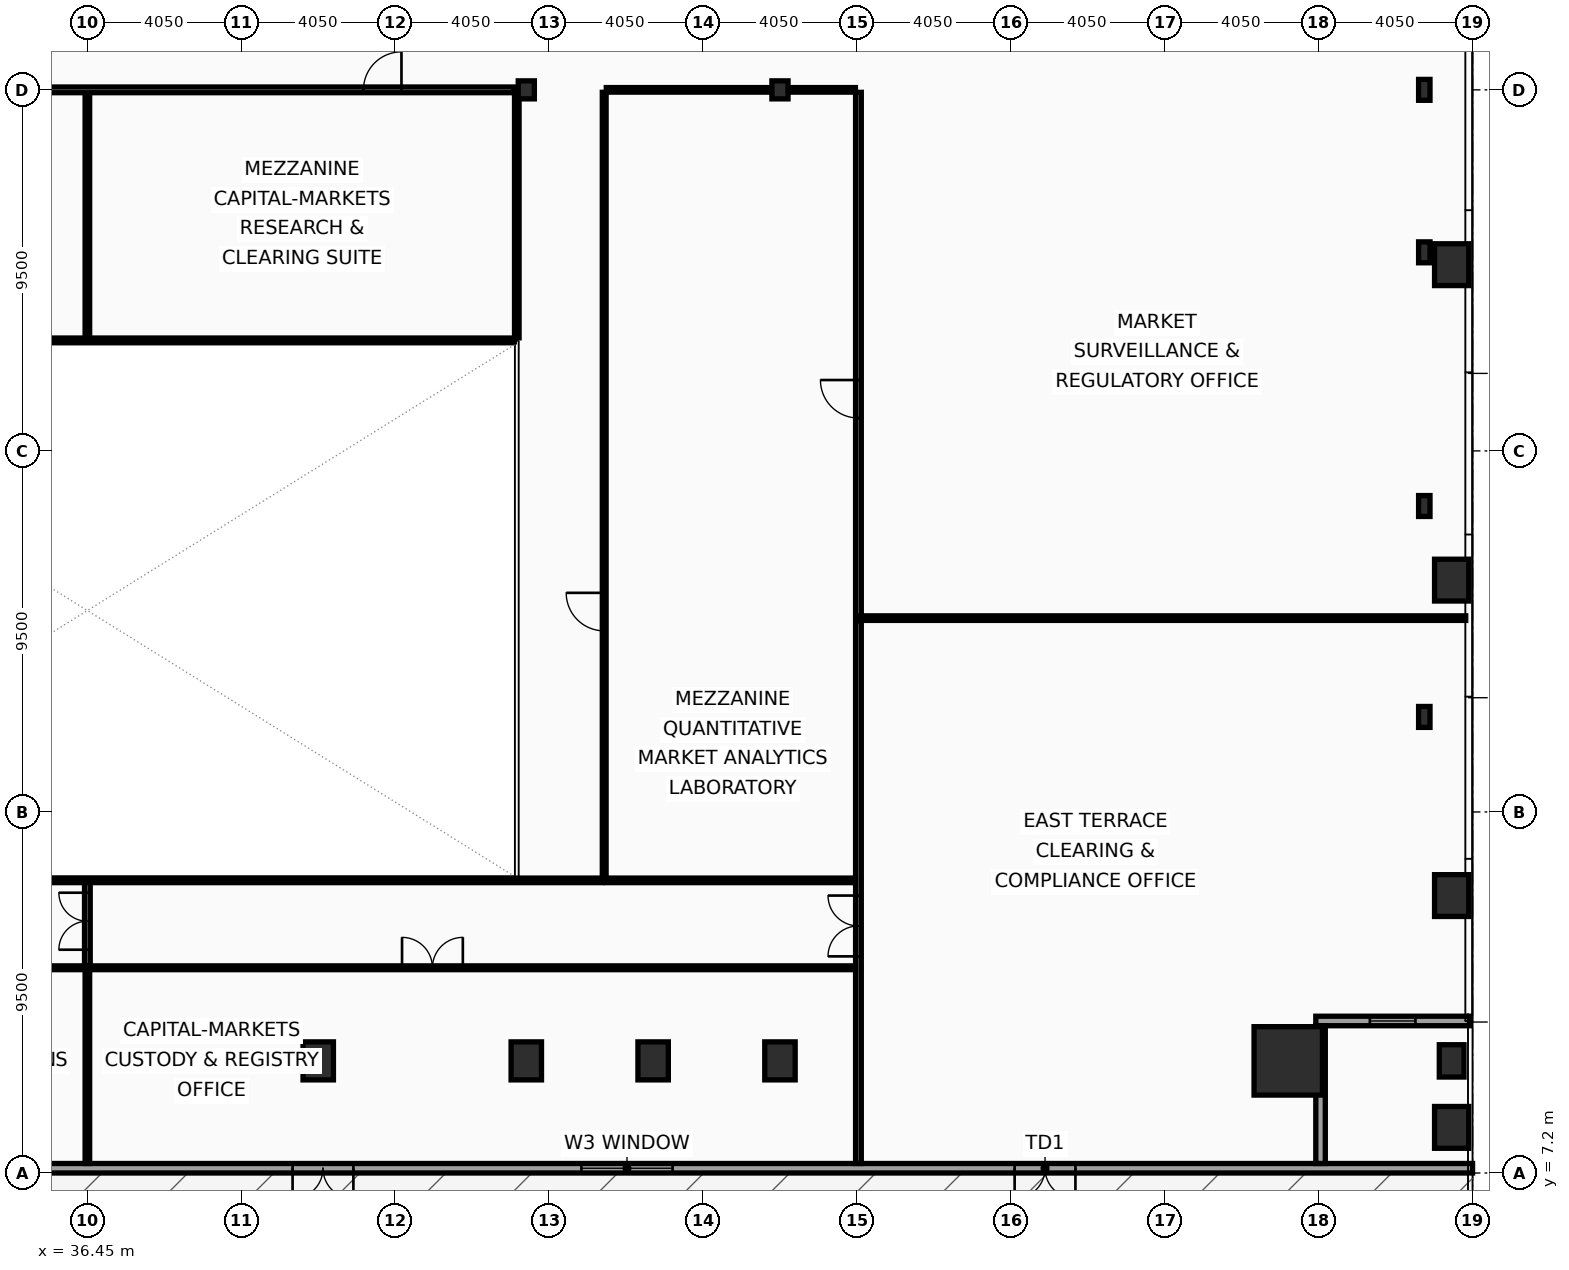
"""IFC4 building model, lengths in metres.
Left out: names, types, materials, properties, quantities, classifications, styles, units other than length and angle.
Written with IfcOpenShell. Run it as: python <this file> out.ifc"""

import sys

from ifc_helpers import new_model, si_unit, direction, frame, frame_2d, origin, origin_2d, place, context, subcontext, project, spatial, rectangle, hollow_rectangle, i_section, extrude, element, fill, save


model = new_model("IFC4")
c1 = context("Model", 3, precision=1e-05, world=origin(), true_north=direction((0.0, 1.0)))
c2 = subcontext(c1, "Body", "Model", "MODEL_VIEW")
j1 = project(units=[si_unit("LENGTHUNIT", "METRE"), si_unit("PLANEANGLEUNIT", "RADIAN")], contexts=[c1])
p1 = place(None, origin())
s1 = spatial("IfcSite", under=j1, at=p1, CompositionType="ELEMENT")
p2 = place(p1, origin())
s2 = spatial("IfcBuilding", under=s1, at=p2, CompositionType="ELEMENT")
p3 = place(p2, frame((0.0, 0.0, 5.4)))
s3 = spatial("IfcBuildingStorey", under=s2, at=p3, CompositionType="ELEMENT", Elevation=5.4)
p4 = place(p3, frame((68.05, 10.15, 0.0), z_axis=(0.0, 0.0, 1.0), x_axis=(1.0, 0.0, 0.0)))
e1 = element("IfcColumn", 1, at=p4, inside=s3, PredefinedType="COLUMN", context=c2, shape_type="SweptSolid", body=[
    extrude(hollow_rectangle(XDim=1.8, YDim=1.8, WallThickness=0.08, at=origin_2d()), origin(), (0.0, 0.0, 1.0), 5.0),
])
for number, where, z_axis, x_axis in (
    (2, (42.525, 10.15, 0.0), (0.0, 0.0, 1.0), (1.0, 0.0, 0.0)),
    (3, (48.0, 10.15, 0.0), (0.0, 0.0, 1.0), (1.0, 0.0, 0.0)),
    (4, (51.337, 10.15, 0.0), (0.0, 0.0, 1.0), (1.0, 0.0, 0.0)),
    (5, (54.675, 10.15, 0.0), (0.0, 0.0, 1.0), (1.0, 0.0, 0.0)),
):
    element("IfcColumn", number, at=place(p3, frame(where, z_axis=z_axis, x_axis=x_axis)), inside=s3, PredefinedType="COLUMN", context=c2, shape_type="SweptSolid", body=[
        extrude(hollow_rectangle(XDim=0.8, YDim=1.0, WallThickness=0.055, at=origin_2d()), origin(), (0.0, 0.0, 1.0), 5.0),
    ])
for number, where, z_axis, x_axis in (
    (6, (71.63, 19.2, 0.0), (0.0, 0.0, 1.0), (1.0, 0.0, 0.0)),
    (7, (71.63, 24.75, 0.0), (0.0, 0.0, 1.0), (1.0, 0.0, 0.0)),
    (8, (71.63, 31.425, 0.0), (0.0, 0.0, 1.0), (1.0, 0.0, 0.0)),
    (9, (71.63, 35.7, 0.0), (0.0, 0.0, 1.0), (1.0, 0.0, 0.0)),
):
    element("IfcColumn", number, at=place(p3, frame(where, z_axis=z_axis, x_axis=x_axis)), inside=s3, PredefinedType="COLUMN", context=c2, shape_type="SweptSolid", body=[
        extrude(i_section(OverallWidth=0.3, OverallDepth=0.55, WebThickness=0.015, FlangeThickness=0.029, at=origin_2d()), origin(), (0.0, 0.0, 1.0), 5.0),
    ])
for number, where, z_axis, x_axis in (
    (10, (48.0, 35.7, 0.0), (0.0, 0.0, 1.0), (1.0, 0.0, 0.0)),
    (11, (54.675, 35.7, 0.0), (0.0, 0.0, 1.0), (1.0, 0.0, 0.0)),
):
    element("IfcColumn", number, at=place(p3, frame(where, z_axis=z_axis, x_axis=x_axis)), inside=s3, PredefinedType="COLUMN", context=c2, shape_type="SweptSolid", body=[
        extrude(i_section(OverallWidth=0.424, OverallDepth=0.474, WebThickness=0.048, FlangeThickness=0.077, at=origin_2d()), origin(), (0.0, 0.0, 1.0), 5.0),
    ])
p5 = place(p3, frame((72.35, 8.4, 0.0), z_axis=(0.0, 0.0, 1.0), x_axis=(1.0, 0.0, 0.0)))
e12 = element("IfcColumn", 12, at=p5, inside=s3, PredefinedType="PILASTER", context=c2, shape_type="SweptSolid", body=[
    extrude(rectangle(XDim=0.9, YDim=1.1, at=origin_2d()), origin(), (0.0, 0.0, 1.0), 5.0),
])
p6 = place(p3, frame((72.35, 10.15, 0.0), z_axis=(0.0, 0.0, 1.0), x_axis=(1.0, 0.0, 0.0)))
e13 = element("IfcColumn", 13, at=p6, inside=s3, PredefinedType="PILASTER", context=c2, shape_type="SweptSolid", body=[
    extrude(rectangle(XDim=0.65, YDim=0.85, at=origin_2d()), origin(), (0.0, 0.0, 1.0), 5.0),
])
for number, where, z_axis, x_axis in (
    (14, (72.35, 14.5, 0.0), (0.0, 0.0, 1.0), (1.0, 0.0, 0.0)),
    (15, (72.35, 22.8, 0.0), (0.0, 0.0, 1.0), (1.0, 0.0, 0.0)),
    (16, (72.35, 31.1, 0.0), (0.0, 0.0, 1.0), (1.0, 0.0, 0.0)),
):
    element("IfcColumn", number, at=place(p3, frame(where, z_axis=z_axis, x_axis=x_axis)), inside=s3, PredefinedType="PILASTER", context=c2, shape_type="SweptSolid", body=[
        extrude(rectangle(XDim=0.9, YDim=1.1, at=origin_2d()), origin(), (0.0, 0.0, 1.0), 5.0),
    ])
p7 = place(p3, frame((72.9, 7.325, 0.0), z_axis=(0.0, 0.0, 1.0), x_axis=(-1.0, 0.0, 0.0)))
e17 = element("IfcWall", 17, at=p7, inside=s3, PredefinedType="SOLIDWALL", context=c2, shape_type="SweptSolid", body=[
    extrude(rectangle(XDim=72.9, YDim=0.25, at=frame_2d((36.45, 0.0))), origin(), (0.0, 0.0, 1.0), 3.89),
])
p8 = place(p7, frame((10.45, 0.0, 0.0)))
e18 = element("IfcOpeningElement", 18, at=p8, cuts=e17, PredefinedType="OPENING", context=c2, shape_type="SweptSolid", body=[
    extrude(rectangle(XDim=1.6, YDim=2.2, at=frame_2d((0.8, 1.1))), frame((0.0, 0.135, 0.0), z_axis=(0.0, -1.0, 0.0), x_axis=(1.0, 0.0, 0.0)), (0.0, 0.0, 1.0), 0.27),
])
p9 = place(p7, frame((29.45, 0.0, 0.0)))
e19 = element("IfcOpeningElement", 19, at=p9, cuts=e17, PredefinedType="OPENING", context=c2, shape_type="SweptSolid", body=[
    extrude(rectangle(XDim=1.6, YDim=2.2, at=frame_2d((0.8, 1.1))), frame((0.0, 0.135, 0.0), z_axis=(0.0, -1.0, 0.0), x_axis=(1.0, 0.0, 0.0)), (0.0, 0.0, 1.0), 0.27),
])
p10 = place(p7, frame((60.65, 0.0, 0.0)))
e20 = element("IfcOpeningElement", 20, at=p10, cuts=e17, PredefinedType="OPENING", context=c2, shape_type="SweptSolid", body=[
    extrude(rectangle(XDim=1.05, YDim=2.15, at=frame_2d((0.525, 1.075))), frame((0.0, 0.135, 0.0), z_axis=(0.0, -1.0, 0.0), x_axis=(1.0, 0.0, 0.0)), (0.0, 0.0, 1.0), 0.27),
])
p11 = place(p7, frame((21.05, 0.0, 0.85)))
e21 = element("IfcOpeningElement", 21, at=p11, cuts=e17, PredefinedType="OPENING", context=c2, shape_type="SweptSolid", body=[
    extrude(rectangle(XDim=2.4, YDim=2.6, at=frame_2d((1.2, 1.3))), frame((0.0, 0.135, 0.0), z_axis=(0.0, -1.0, 0.0), x_axis=(1.0, 0.0, 0.0)), (0.0, 0.0, 1.0), 0.27),
])
p12 = place(p7, frame((49.65, 0.0, 0.85)))
e22 = element("IfcOpeningElement", 22, at=p12, cuts=e17, PredefinedType="OPENING", context=c2, shape_type="SweptSolid", body=[
    extrude(rectangle(XDim=2.4, YDim=2.6, at=frame_2d((1.2, 1.3))), frame((0.0, 0.135, 0.0), z_axis=(0.0, -1.0, 0.0), x_axis=(1.0, 0.0, 0.0)), (0.0, 0.0, 1.0), 0.27),
])
p13 = place(p3, frame((72.82, 11.2, 0.0), z_axis=(0.0, 0.0, 1.0), x_axis=(-1.0, 0.0, 0.0)))
e23 = element("IfcWall", 23, at=p13, inside=s3, PredefinedType="SOLIDWALL", context=c2, shape_type="SweptSolid", body=[
    extrude(rectangle(XDim=4.045, YDim=0.25, at=frame_2d((2.022, 0.0))), origin(), (0.0, 0.0, 1.0), 4.14),
])
p14 = place(p13, frame((1.423, 0.0, 0.9)))
e24 = element("IfcOpeningElement", 24, at=p14, cuts=e23, PredefinedType="OPENING", context=c2, shape_type="SweptSolid", body=[
    extrude(rectangle(XDim=1.2, YDim=2.8, at=frame_2d((0.6, 1.4))), frame((0.0, 0.135, 0.0), z_axis=(0.0, -1.0, 0.0), x_axis=(1.0, 0.0, 0.0)), (0.0, 0.0, 1.0), 0.27),
])
p15 = place(p3, frame((68.9, 11.075, 0.0), z_axis=(0.0, 0.0, 1.0), x_axis=(0.0, -1.0, 0.0)))
e25 = element("IfcWall", 25, at=p15, inside=s3, PredefinedType="SOLIDWALL", context=c2, shape_type="SweptSolid", body=[
    extrude(rectangle(XDim=3.625, YDim=0.25, at=frame_2d((1.812, 0.0))), origin(), (0.0, 0.0, 1.0), 4.14),
])
p16 = place(p3, frame((56.74, 7.45, 0.0), z_axis=(0.0, 0.0, 1.0), x_axis=(0.0, 1.0, 0.0)))
e26 = element("IfcWall", 26, at=p16, inside=s3, PredefinedType="PARTITIONING", context=c2, shape_type="SweptSolid", body=[
    extrude(rectangle(XDim=14.285, YDim=0.15, at=frame_2d((7.143, 0.0))), origin(), (0.0, 0.0, 1.0), 3.89),
])
p17 = place(p16, frame((5.45, 0.0, 0.0)))
e27 = element("IfcOpeningElement", 27, at=p17, cuts=e26, PredefinedType="OPENING", context=c2, shape_type="SweptSolid", body=[
    extrude(rectangle(XDim=1.6, YDim=2.15, at=frame_2d((0.8, 1.075))), frame((0.0, 0.085, 0.0), z_axis=(0.0, -1.0, 0.0), x_axis=(1.0, 0.0, 0.0)), (0.0, 0.0, 1.0), 0.17),
])
p18 = place(p3, frame((56.74, 21.865, 0.0), z_axis=(0.0, 0.0, 1.0), x_axis=(0.0, 1.0, 0.0)))
e28 = element("IfcWall", 28, at=p18, inside=s3, PredefinedType="PARTITIONING", context=c2, shape_type="SweptSolid", body=[
    extrude(rectangle(XDim=13.77, YDim=0.15, at=frame_2d((6.885, 0.0))), origin(), (0.0, 0.0, 1.0), 3.89),
])
p19 = place(p18, frame((5.2, 0.0, 0.0)))
e29 = element("IfcOpeningElement", 29, at=p19, cuts=e28, PredefinedType="OPENING", context=c2, shape_type="SweptSolid", body=[
    extrude(rectangle(XDim=1.0, YDim=2.05, at=frame_2d((0.5, 1.025))), frame((0.0, 0.085, 0.0), z_axis=(0.0, -1.0, 0.0), x_axis=(1.0, 0.0, 0.0)), (0.0, 0.0, 1.0), 0.17),
])
p20 = place(p3, frame((56.82, 21.8, 0.0), z_axis=(0.0, 0.0, 1.0), x_axis=(1.0, 0.0, 0.0)))
e30 = element("IfcWall", 30, at=p20, inside=s3, PredefinedType="PARTITIONING", context=c2, shape_type="SweptSolid", body=[
    extrude(rectangle(XDim=15.9, YDim=0.12, at=frame_2d((7.95, 0.0))), origin(), (0.0, 0.0, 1.0), 4.14),
])
p21 = place(p3, frame((16.24, 12.6, 0.0), z_axis=(0.0, 0.0, 1.0), x_axis=(1.0, 0.0, 0.0)))
e31 = element("IfcWall", 31, at=p21, inside=s3, PredefinedType="MOVABLE", context=c2, shape_type="SweptSolid", body=[
    extrude(rectangle(XDim=20.13, YDim=0.1, at=frame_2d((10.065, 0.0))), origin(), (0.0, 0.0, 1.0), 3.89),
])
p22 = place(p21, frame((8.2, 0.0, 0.0)))
e32 = element("IfcOpeningElement", 32, at=p22, cuts=e31, PredefinedType="OPENING", context=c2, shape_type="SweptSolid", body=[
    extrude(rectangle(XDim=1.6, YDim=2.15, at=frame_2d((0.8, 1.075))), frame((0.0, 0.06, 0.0), z_axis=(0.0, -1.0, 0.0), x_axis=(1.0, 0.0, 0.0)), (0.0, 0.0, 1.0), 0.12),
])
p23 = place(p3, frame((36.53, 12.6, 0.0), z_axis=(0.0, 0.0, 1.0), x_axis=(1.0, 0.0, 0.0)))
e33 = element("IfcWall", 33, at=p23, inside=s3, PredefinedType="MOVABLE", context=c2, shape_type="SweptSolid", body=[
    extrude(rectangle(XDim=20.13, YDim=0.1, at=frame_2d((10.065, 0.0))), origin(), (0.0, 0.0, 1.0), 3.89),
])
p24 = place(p23, frame((8.2, 0.0, 0.0)))
e34 = element("IfcOpeningElement", 34, at=p24, cuts=e33, PredefinedType="OPENING", context=c2, shape_type="SweptSolid", body=[
    extrude(rectangle(XDim=1.6, YDim=2.15, at=frame_2d((0.8, 1.075))), frame((0.0, 0.06, 0.0), z_axis=(0.0, -1.0, 0.0), x_axis=(1.0, 0.0, 0.0)), (0.0, 0.0, 1.0), 0.12),
])
p25 = place(p3, frame((36.45, 7.45, 0.0), z_axis=(0.0, 0.0, 1.0), x_axis=(0.0, 1.0, 0.0)))
e35 = element("IfcWall", 35, at=p25, inside=s3, PredefinedType="PARTITIONING", context=c2, shape_type="SweptSolid", body=[
    extrude(rectangle(XDim=5.095, YDim=0.12, at=frame_2d((2.547, 0.0))), origin(), (0.0, 0.0, 1.0), 4.14),
])
p26 = place(p3, frame((25.215, 29.12, 0.0), z_axis=(0.0, 0.0, 1.0), x_axis=(1.0, 0.0, 0.0)))
e36 = element("IfcWall", 36, at=p26, inside=s3, PredefinedType="MOVABLE", context=c2, shape_type="SweptSolid", body=[
    extrude(rectangle(XDim=22.47, YDim=0.1, at=frame_2d((11.235, 0.0))), origin(), (0.0, 0.0, 1.0), 3.89),
])
p27 = place(p3, frame((36.45, 29.175, 0.0), z_axis=(0.0, 0.0, 1.0), x_axis=(0.0, 1.0, 0.0)))
e37 = element("IfcWall", 37, at=p27, inside=s3, PredefinedType="PARTITIONING", context=c2, shape_type="SweptSolid", body=[
    extrude(rectangle(XDim=6.445, YDim=0.12, at=frame_2d((3.223, 0.0))), origin(), (0.0, 0.0, 1.0), 3.89),
])
p28 = place(p3, frame((25.215, 35.7, 0.0), z_axis=(0.0, 0.0, 1.0), x_axis=(1.0, 0.0, 0.0)))
e38 = element("IfcWall", 38, at=p28, inside=s3, PredefinedType="PARTITIONING", context=c2, shape_type="SweptSolid", body=[
    extrude(rectangle(XDim=22.47, YDim=0.15, at=frame_2d((11.235, 0.0))), origin(), (0.0, 0.0, 1.0), 3.89),
])
p29 = place(p28, frame((6.0, 0.0, 0.0)))
e39 = element("IfcOpeningElement", 39, at=p29, cuts=e38, PredefinedType="OPENING", context=c2, shape_type="SweptSolid", body=[
    extrude(rectangle(XDim=1.0, YDim=2.05, at=frame_2d((0.5, 1.025))), frame((0.0, 0.085, 0.0), z_axis=(0.0, -1.0, 0.0), x_axis=(1.0, 0.0, 0.0)), (0.0, 0.0, 1.0), 0.17),
])
p30 = place(p28, frame((18.5, 0.0, 0.0)))
e40 = element("IfcOpeningElement", 40, at=p30, cuts=e38, PredefinedType="OPENING", context=c2, shape_type="SweptSolid", body=[
    extrude(rectangle(XDim=1.0, YDim=2.05, at=frame_2d((0.5, 1.025))), frame((0.0, 0.085, 0.0), z_axis=(0.0, -1.0, 0.0), x_axis=(1.0, 0.0, 0.0)), (0.0, 0.0, 1.0), 0.17),
])
p31 = place(p3, frame((47.75, 29.175, 0.0), z_axis=(0.0, 0.0, 1.0), x_axis=(0.0, 1.0, 0.0)))
e41 = element("IfcWall", 41, at=p31, inside=s3, PredefinedType="PARTITIONING", context=c2, shape_type="SweptSolid", body=[
    extrude(rectangle(XDim=6.445, YDim=0.12, at=frame_2d((3.223, 0.0))), origin(), (0.0, 0.0, 1.0), 3.89),
])
p32 = place(p3, frame((50.05, 14.965, 0.0), z_axis=(0.0, 0.0, 1.0), x_axis=(0.0, 1.0, 0.0)))
e42 = element("IfcWall", 42, at=p32, inside=s3, PredefinedType="MOVABLE", context=c2, shape_type="SweptSolid", body=[
    extrude(rectangle(XDim=20.67, YDim=0.1, at=frame_2d((10.335, 0.0))), origin(), (0.0, 0.0, 1.0), 4.19),
])
p33 = place(p32, frame((6.5, 0.0, 0.0)))
e43 = element("IfcOpeningElement", 43, at=p33, cuts=e42, PredefinedType="OPENING", context=c2, shape_type="SweptSolid", body=[
    extrude(rectangle(XDim=1.0, YDim=2.05, at=frame_2d((0.5, 1.025))), frame((0.0, 0.06, 0.0), z_axis=(0.0, -1.0, 0.0), x_axis=(1.0, 0.0, 0.0)), (0.0, 0.0, 1.0), 0.12),
])
for number, where, z_axis, x_axis in (
    (44, (50.105, 14.9, 0.0), (0.0, 0.0, 1.0), (1.0, 0.0, 0.0)),
    (45, (50.105, 35.7, 0.0), (0.0, 0.0, 1.0), (1.0, 0.0, 0.0)),
):
    element("IfcWall", number, at=place(p3, frame(where, z_axis=z_axis, x_axis=x_axis)), inside=s3, PredefinedType="PARTITIONING", context=c2, shape_type="SweptSolid", body=[
        extrude(rectangle(XDim=6.555, YDim=0.12, at=frame_2d((3.277, 0.0))), origin(), (0.0, 0.0, 1.0), 3.89),
    ])
p34 = place(p3, frame((36.45, 12.655, 0.0), z_axis=(0.0, 0.0, 1.0), x_axis=(0.0, 1.0, 0.0)))
e46 = element("IfcWall", 46, at=p34, inside=s3, PredefinedType="PARTITIONING", context=c2, shape_type="SweptSolid", body=[
    extrude(rectangle(XDim=2.28, YDim=0.15, at=frame_2d((1.14, 0.0))), origin(), (0.0, 0.0, 1.0), 3.89),
])
p35 = place(p34, frame((0.42, 0.0, 0.0)))
e47 = element("IfcOpeningElement", 47, at=p35, cuts=e46, PredefinedType="OPENING", context=c2, shape_type="SweptSolid", body=[
    extrude(rectangle(XDim=1.5, YDim=2.15, at=frame_2d((0.75, 1.075))), frame((0.0, 0.085, 0.0), z_axis=(0.0, -1.0, 0.0), x_axis=(1.0, 0.0, 0.0)), (0.0, 0.0, 1.0), 0.17),
])
p36 = place(p3, frame((22.905, 14.9, 0.0), z_axis=(0.0, 0.0, 1.0), x_axis=(1.0, 0.0, 0.0)))
e48 = element("IfcWall", 48, at=p36, inside=s3, PredefinedType="PARTITIONING", context=c2, shape_type="SweptSolid", body=[
    extrude(rectangle(XDim=27.09, YDim=0.12, at=frame_2d((13.545, 0.0))), origin(), (0.0, 0.0, 1.0), 3.89),
])
p37 = place(p8, origin())
e49 = element("IfcDoor", 49, at=p37, inside=s3, OperationType="DOUBLE_DOOR_SINGLE_SWING", PredefinedType="DOOR", context=c2, shape_type="SweptSolid", body=[
    extrude(rectangle(XDim=1.6, YDim=2.2, at=frame_2d((0.8, 1.1))), frame((0.0, 0.025, 0.0), z_axis=(0.0, -1.0, 0.0), x_axis=(1.0, 0.0, 0.0)), (0.0, 0.0, 1.0), 0.05),
])
fill(e18, e49)
p38 = place(p9, origin())
e50 = element("IfcDoor", 50, at=p38, inside=s3, OperationType="DOUBLE_DOOR_SINGLE_SWING", PredefinedType="DOOR", context=c2, shape_type="SweptSolid", body=[
    extrude(rectangle(XDim=1.6, YDim=2.2, at=frame_2d((0.8, 1.1))), frame((0.0, 0.025, 0.0), z_axis=(0.0, -1.0, 0.0), x_axis=(1.0, 0.0, 0.0)), (0.0, 0.0, 1.0), 0.05),
])
fill(e19, e50)
p39 = place(p11, origin())
e51 = element("IfcWindow", 51, at=p39, inside=s3, PartitioningType="SINGLE_PANEL", PredefinedType="WINDOW", context=c2, shape_type="SweptSolid", body=[
    extrude(rectangle(XDim=2.4, YDim=2.6, at=frame_2d((1.2, 1.3))), frame((0.0, 0.03, 0.0), z_axis=(0.0, -1.0, 0.0), x_axis=(1.0, 0.0, 0.0)), (0.0, 0.0, 1.0), 0.06),
])
fill(e21, e51)
p40 = place(p14, origin())
e52 = element("IfcWindow", 52, at=p40, inside=s3, PartitioningType="SINGLE_PANEL", PredefinedType="WINDOW", context=c2, shape_type="SweptSolid", body=[
    extrude(rectangle(XDim=1.2, YDim=2.8, at=frame_2d((0.6, 1.4))), frame((0.0, 0.03, 0.0), z_axis=(0.0, -1.0, 0.0), x_axis=(1.0, 0.0, 0.0)), (0.0, 0.0, 1.0), 0.06),
])
fill(e24, e52)
p41 = place(p17, origin())
e53 = element("IfcDoor", 53, at=p41, inside=s3, OperationType="DOUBLE_DOOR_SINGLE_SWING", PredefinedType="DOOR", context=c2, shape_type="SweptSolid", body=[
    extrude(rectangle(XDim=1.6, YDim=2.15, at=frame_2d((0.8, 1.075))), frame((0.0, 0.025, 0.0), z_axis=(0.0, -1.0, 0.0), x_axis=(1.0, 0.0, 0.0)), (0.0, 0.0, 1.0), 0.05),
])
fill(e27, e53)
p42 = place(p19, origin())
e54 = element("IfcDoor", 54, at=p42, inside=s3, OperationType="SINGLE_SWING_RIGHT", PredefinedType="DOOR", context=c2, shape_type="SweptSolid", body=[
    extrude(rectangle(XDim=1.0, YDim=2.05, at=frame_2d((0.5, 1.025))), frame((0.0, 0.025, 0.0), z_axis=(0.0, -1.0, 0.0), x_axis=(1.0, 0.0, 0.0)), (0.0, 0.0, 1.0), 0.05),
])
fill(e29, e54)
p43 = place(p24, origin())
e55 = element("IfcDoor", 55, at=p43, inside=s3, OperationType="DOUBLE_DOOR_SINGLE_SWING", PredefinedType="DOOR", context=c2, shape_type="SweptSolid", body=[
    extrude(rectangle(XDim=1.6, YDim=2.15, at=frame_2d((0.8, 1.075))), frame((0.0, 0.025, 0.0), z_axis=(0.0, -1.0, 0.0), x_axis=(1.0, 0.0, 0.0)), (0.0, 0.0, 1.0), 0.05),
])
fill(e34, e55)
p44 = place(p30, origin())
e56 = element("IfcDoor", 56, at=p44, inside=s3, OperationType="SINGLE_SWING_RIGHT", PredefinedType="DOOR", context=c2, shape_type="SweptSolid", body=[
    extrude(rectangle(XDim=1.0, YDim=2.05, at=frame_2d((0.5, 1.025))), frame((0.0, 0.025, 0.0), z_axis=(0.0, -1.0, 0.0), x_axis=(1.0, 0.0, 0.0)), (0.0, 0.0, 1.0), 0.05),
])
fill(e40, e56)
p45 = place(p33, origin())
e57 = element("IfcDoor", 57, at=p45, inside=s3, OperationType="SINGLE_SWING_RIGHT", PredefinedType="DOOR", context=c2, shape_type="SweptSolid", body=[
    extrude(rectangle(XDim=1.0, YDim=2.05, at=frame_2d((0.5, 1.025))), frame((0.0, 0.025, 0.0), z_axis=(0.0, -1.0, 0.0), x_axis=(1.0, 0.0, 0.0)), (0.0, 0.0, 1.0), 0.05),
])
fill(e43, e57)
p46 = place(p35, origin())
e58 = element("IfcDoor", 58, at=p46, inside=s3, OperationType="DOUBLE_DOOR_SINGLE_SWING", PredefinedType="DOOR", context=c2, shape_type="SweptSolid", body=[
    extrude(rectangle(XDim=1.5, YDim=2.15, at=frame_2d((0.75, 1.075))), frame((0.0, 0.025, 0.0), z_axis=(0.0, -1.0, 0.0), x_axis=(1.0, 0.0, 0.0)), (0.0, 0.0, 1.0), 0.05),
])
fill(e47, e58)
save(model, sys.argv[1])
